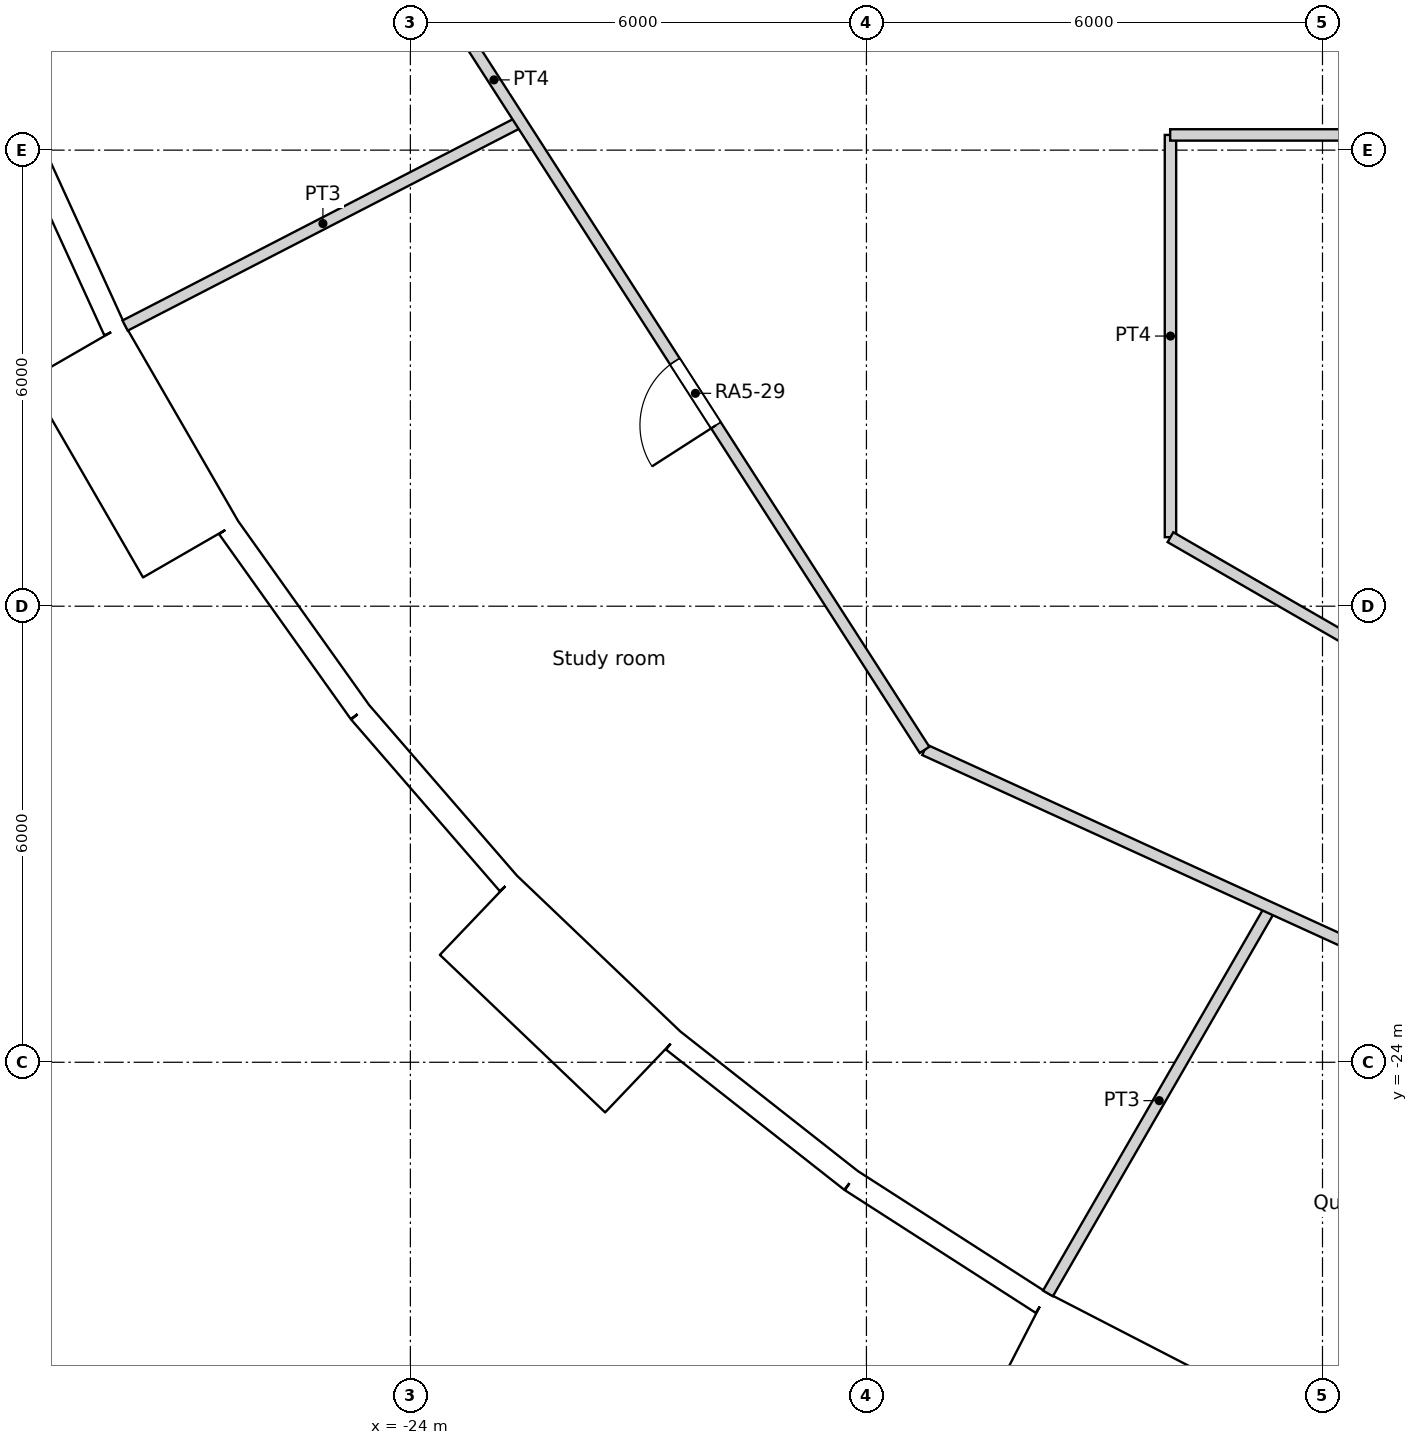
"""IFC4 building model, lengths in metres.
Left out: names, types, materials, properties, quantities, classifications, styles, units other than length and angle.
Written with IfcOpenShell. Run it as: python <this file> out.ifc"""

import sys

from ifc_helpers import new_model, si_unit, direction, frame, frame_2d, origin, origin_2d, place, context, subcontext, project, spatial, rectangle, circle, extrude, element, fill, save


model = new_model("IFC4")
c1 = context("Model", 3, precision=1e-05, world=origin(), true_north=direction((0.0, 1.0)))
c2 = subcontext(c1, "Body", "Model", "MODEL_VIEW")
j1 = project(units=[si_unit("LENGTHUNIT", "METRE"), si_unit("PLANEANGLEUNIT", "RADIAN")], contexts=[c1])
p1 = place(None, origin())
s1 = spatial("IfcSite", under=j1, at=p1, CompositionType="ELEMENT")
p2 = place(p1, origin())
s2 = spatial("IfcBuilding", under=s1, at=p2, CompositionType="ELEMENT")
p3 = place(p2, frame((0.0, 0.0, 71.4)))
s3 = spatial("IfcBuildingStorey", under=s2, at=p3, CompositionType="ELEMENT", Elevation=71.4)
for number, where, z_axis, x_axis in (
    (1, (-26.909, -13.873, 0.0), (0.0, 0.0, 1.0), (1.0, 0.0, 0.0)),
    (2, (-23.797, -18.715, 0.0), (0.0, 0.0, 1.0), (1.0, 0.0, 0.0)),
    (3, (-19.826, -22.88, 0.0), (0.0, 0.0, 1.0), (1.0, 0.0, 0.0)),
    (4, (-15.137, -26.219, 0.0), (0.0, 0.0, 1.0), (1.0, 0.0, 0.0)),
):
    element("IfcColumn", number, at=place(p3, frame(where, z_axis=z_axis, x_axis=x_axis)), inside=s3, PredefinedType="COLUMN", context=c2, shape_type="SweptSolid", body=[
        extrude(circle(Radius=0.6, at=origin_2d()), origin(), (0.0, 0.0, 1.0), 3.6),
    ])
for number, where, z_axis, x_axis in (
    (5, (-20.509, -13.489, 0.0), (0.0, 0.0, 1.0), (1.0, 0.0, 0.0)),
    (6, (-16.846, -17.855, 0.0), (0.0, 0.0, 1.0), (1.0, 0.0, 0.0)),
    (7, (-12.274, -21.259, 0.0), (0.0, 0.0, 1.0), (1.0, 0.0, 0.0)),
):
    element("IfcColumn", number, at=place(p3, frame(where, z_axis=z_axis, x_axis=x_axis)), inside=s3, PredefinedType="COLUMN", context=c2, shape_type="SweptSolid", body=[
        extrude(circle(Radius=0.65, at=origin_2d()), origin(), (0.0, 0.0, 1.0), 3.6),
    ])
p4 = place(p3, frame((-13.798, -12.802, 0.0), z_axis=(0.0, 0.0, 1.0), x_axis=(1.0, 0.0, 0.0)))
e8 = element("IfcColumn", 8, at=p4, inside=s3, PredefinedType="COLUMN", context=c2, shape_type="SweptSolid", body=[
    extrude(circle(Radius=0.7, at=origin_2d()), origin(), (0.0, 0.0, 1.0), 3.6),
])
p5 = place(p3, frame((-29.127, -11.661, 0.0), z_axis=(0.0, 0.0, 1.0), x_axis=(0.415407317162, -0.909635509888, 0.0)))
e9 = element("IfcWall", 9, at=p5, inside=s3, PredefinedType="SOLIDWALL", context=c2, shape_type="SweptSolid", body=[
    extrude(rectangle(XDim=2.98, YDim=0.3, at=frame_2d((1.49, 0.0))), origin(), (0.0, 0.0, 1.0), 3.15),
])
p6 = place(p5, frame((1.49, 0.0, 1.55)))
e10 = element("IfcOpeningElement", 10, at=p6, cuts=e9, PredefinedType="OPENING", context=c2, shape_type="SweptSolid", body=[
    extrude(circle(Radius=0.9, at=origin_2d()), frame((0.0, 0.16, 0.0), z_axis=(0.0, -1.0, 0.0), x_axis=(1.0, 0.0, 0.0)), (0.0, 0.0, 1.0), 0.32),
])
p7 = place(p3, frame((-28.388, -14.658, -0.45), z_axis=(0.0, 0.0, 1.0), x_axis=(0.499990139034, -0.866031096941, 0.0)))
e11 = element("IfcWall", 11, at=p7, inside=s3, PredefinedType="ELEMENTEDWALL", context=c2, shape_type="SweptSolid", body=[
    extrude(rectangle(XDim=3.0, YDim=1.45, at=frame_2d((1.5, 0.0))), origin(), (0.0, 0.0, 1.0), 3.6),
])
p8 = place(p7, frame((1.5, 0.0, 2.0)))
e12 = element("IfcOpeningElement", 12, at=p8, cuts=e11, PredefinedType="OPENING", context=c2, shape_type="SweptSolid", body=[
    extrude(circle(Radius=0.9, at=origin_2d()), frame((0.0, 0.735, 0.0), z_axis=(0.0, -1.0, 0.0), x_axis=(1.0, 0.0, 0.0)), (0.0, 0.0, 1.0), 1.47),
])
p9 = place(p3, frame((-26.39, -16.967, 0.0), z_axis=(0.0, 0.0, 1.0), x_axis=(0.580113774115, -0.814535456, 0.0)))
e13 = element("IfcWall", 13, at=p9, inside=s3, PredefinedType="SOLIDWALL", context=c2, shape_type="SweptSolid", body=[
    extrude(rectangle(XDim=2.98, YDim=0.3, at=frame_2d((1.49, 0.0))), origin(), (0.0, 0.0, 1.0), 3.15),
])
p10 = place(p9, frame((1.49, 0.0, 1.55)))
e14 = element("IfcOpeningElement", 14, at=p10, cuts=e13, PredefinedType="OPENING", context=c2, shape_type="SweptSolid", body=[
    extrude(circle(Radius=0.9, at=origin_2d()), frame((0.0, 0.16, 0.0), z_axis=(0.0, -1.0, 0.0), x_axis=(1.0, 0.0, 0.0)), (0.0, 0.0, 1.0), 0.32),
])
p11 = place(p3, frame((-24.662, -19.394, 0.0), z_axis=(0.0, 0.0, 1.0), x_axis=(0.654830712471, -0.755775587066, 0.0)))
e15 = element("IfcWall", 15, at=p11, inside=s3, PredefinedType="SOLIDWALL", context=c2, shape_type="SweptSolid", body=[
    extrude(rectangle(XDim=2.98, YDim=0.3, at=frame_2d((1.49, 0.0))), origin(), (0.0, 0.0, 1.0), 3.15),
])
p12 = place(p11, frame((1.49, 0.0, 1.55)))
e16 = element("IfcOpeningElement", 16, at=p12, cuts=e15, PredefinedType="OPENING", context=c2, shape_type="SweptSolid", body=[
    extrude(circle(Radius=0.9, at=origin_2d()), frame((0.0, 0.16, 0.0), z_axis=(0.0, -1.0, 0.0), x_axis=(1.0, 0.0, 0.0)), (0.0, 0.0, 1.0), 0.32),
])
p13 = place(p3, frame((-23.109, -22.062, -0.45), z_axis=(0.0, 0.0, 1.0), x_axis=(0.723712023899, -0.690102098579, 0.0)))
e17 = element("IfcWall", 17, at=p13, inside=s3, PredefinedType="ELEMENTEDWALL", context=c2, shape_type="SweptSolid", body=[
    extrude(rectangle(XDim=3.0, YDim=1.45, at=frame_2d((1.5, 0.0))), origin(), (0.0, 0.0, 1.0), 3.6),
])
p14 = place(p13, frame((1.5, 0.0, 2.0)))
e18 = element("IfcOpeningElement", 18, at=p14, cuts=e17, PredefinedType="OPENING", context=c2, shape_type="SweptSolid", body=[
    extrude(circle(Radius=0.9, at=origin_2d()), frame((0.0, 0.735, 0.0), z_axis=(0.0, -1.0, 0.0), x_axis=(1.0, 0.0, 0.0)), (0.0, 0.0, 1.0), 1.47),
])
p15 = place(p3, frame((-20.541, -23.715, 0.0), z_axis=(0.0, 0.0, 1.0), x_axis=(0.786053834673, -0.618158045322, 0.0)))
e19 = element("IfcWall", 19, at=p15, inside=s3, PredefinedType="SOLIDWALL", context=c2, shape_type="SweptSolid", body=[
    extrude(rectangle(XDim=2.979, YDim=0.3, at=frame_2d((1.49, 0.0))), origin(), (0.0, 0.0, 1.0), 3.15),
])
p16 = place(p15, frame((1.49, 0.0, 1.55)))
e20 = element("IfcOpeningElement", 20, at=p16, cuts=e19, PredefinedType="OPENING", context=c2, shape_type="SweptSolid", body=[
    extrude(circle(Radius=0.9, at=origin_2d()), frame((0.0, 0.16, 0.0), z_axis=(0.0, -1.0, 0.0), x_axis=(1.0, 0.0, 0.0)), (0.0, 0.0, 1.0), 0.32),
])
p17 = place(p3, frame((-18.199, -25.557, 0.0), z_axis=(0.0, 0.0, 1.0), x_axis=(0.841260995538, -0.54062920508, 0.0)))
e21 = element("IfcWall", 21, at=p17, inside=s3, PredefinedType="SOLIDWALL", context=c2, shape_type="SweptSolid", body=[
    extrude(rectangle(XDim=2.979, YDim=0.3, at=frame_2d((1.49, 0.0))), origin(), (0.0, 0.0, 1.0), 3.15),
])
p18 = place(p17, frame((1.49, 0.0, 1.55)))
e22 = element("IfcOpeningElement", 22, at=p18, cuts=e21, PredefinedType="OPENING", context=c2, shape_type="SweptSolid", body=[
    extrude(circle(Radius=0.9, at=origin_2d()), frame((0.0, 0.16, 0.0), z_axis=(0.0, -1.0, 0.0), x_axis=(1.0, 0.0, 0.0)), (0.0, 0.0, 1.0), 0.32),
])
p19 = place(p3, frame((-15.957, -27.679, -0.45), z_axis=(0.0, 0.0, 1.0), x_axis=(0.888858064689, -0.458182650083, 0.0)))
e23 = element("IfcWall", 23, at=p19, inside=s3, PredefinedType="ELEMENTEDWALL", context=c2, shape_type="SweptSolid", body=[
    extrude(rectangle(XDim=3.0, YDim=1.45, at=frame_2d((1.5, 0.0))), origin(), (0.0, 0.0, 1.0), 3.6),
])
p20 = place(p19, frame((1.5, 0.0, 2.0)))
e24 = element("IfcOpeningElement", 24, at=p20, cuts=e23, PredefinedType="OPENING", context=c2, shape_type="SweptSolid", body=[
    extrude(circle(Radius=0.9, at=origin_2d()), frame((0.0, 0.735, 0.0), z_axis=(0.0, -1.0, 0.0), x_axis=(1.0, 0.0, 0.0)), (0.0, 0.0, 1.0), 1.47),
])
p21 = place(p3, frame((-14.004, -11.8, 0.0), z_axis=(0.0, 0.0, 1.0), x_axis=(1.0, 0.0, 0.0)))
e25 = element("IfcWall", 25, at=p21, inside=s3, PredefinedType="PARTITIONING", context=c2, shape_type="SweptSolid", body=[
    extrude(rectangle(XDim=12.816, YDim=0.15, at=frame_2d((6.408, 0.0))), origin(), (0.0, 0.0, 1.0), 3.15),
])
p22 = place(p21, frame((5.908, 0.0, 0.0)))
e26 = element("IfcOpeningElement", 26, at=p22, cuts=e25, PredefinedType="OPENING", context=c2, shape_type="SweptSolid", body=[
    extrude(rectangle(XDim=1.0, YDim=2.04, at=frame_2d((0.5, 1.02))), frame((0.0, 0.075, 0.0), z_axis=(0.0, -1.0, 0.0), x_axis=(1.0, 0.0, 0.0)), (0.0, 0.0, 1.0), 0.15),
])
p23 = place(p3, frame((-14.0, -17.092, 0.0), z_axis=(0.0, 0.0, 1.0), x_axis=(0.0, 1.0, 0.0)))
e27 = element("IfcWall", 27, at=p23, inside=s3, PredefinedType="PARTITIONING", context=c2, shape_type="SweptSolid", body=[
    extrude(rectangle(XDim=5.292, YDim=0.15, at=frame_2d((2.646, 0.0))), origin(), (0.0, 0.0, 1.0), 3.15),
])
p24 = place(p3, frame((-25.253, -7.415, 0.0), z_axis=(0.0, 0.0, 1.0), x_axis=(0.540656073354, -0.841243728265, 0.0)))
e28 = element("IfcWall", 28, at=p24, inside=s3, PredefinedType="PARTITIONING", context=c2, shape_type="SweptSolid", body=[
    extrude(rectangle(XDim=14.829, YDim=0.15, at=frame_2d((7.415, 0.0))), origin(), (0.0, 0.0, 1.0), 3.15),
])
p25 = place(p24, frame((8.753, 0.0, 0.0)))
e29 = element("IfcOpeningElement", 29, at=p25, cuts=e28, PredefinedType="OPENING", context=c2, shape_type="SweptSolid", body=[
    extrude(rectangle(XDim=1.0, YDim=2.04, at=frame_2d((0.5, 1.02))), frame((0.0, 0.075, 0.0), z_axis=(0.0, -1.0, 0.0), x_axis=(1.0, 0.0, 0.0)), (0.0, 0.0, 1.0), 0.15),
])
p26 = place(p3, frame((-14.0, -17.092, 0.0), z_axis=(0.0, 0.0, 1.0), x_axis=(0.86602719091, -0.499996904595, 0.0)))
e30 = element("IfcWall", 30, at=p26, inside=s3, PredefinedType="PARTITIONING", context=c2, shape_type="SweptSolid", body=[
    extrude(rectangle(XDim=9.42, YDim=0.15, at=frame_2d((4.71, 0.0))), origin(), (0.0, 0.0, 1.0), 3.15),
])
p27 = place(p3, frame((-17.235, -19.89, 0.0), z_axis=(0.0, 0.0, 1.0), x_axis=(0.909645678785, -0.415385049163, 0.0)))
e31 = element("IfcWall", 31, at=p27, inside=s3, PredefinedType="PARTITIONING", context=c2, shape_type="SweptSolid", body=[
    extrude(rectangle(XDim=14.829, YDim=0.15, at=frame_2d((7.415, 0.0))), origin(), (0.0, 0.0, 1.0), 3.15),
])
p28 = place(p3, frame((-27.753, -14.308, 0.0), z_axis=(0.0, 0.0, 1.0), x_axis=(0.88877955153, 0.45833493079, 0.0)))
e32 = element("IfcWall", 32, at=p28, inside=s3, PredefinedType="PARTITIONING", context=c2, shape_type="SweptSolid", body=[
    extrude(rectangle(XDim=5.856, YDim=0.15, at=frame_2d((2.928, 0.0))), origin(), (0.0, 0.0, 1.0), 3.15),
])
p29 = place(p3, frame((-15.612, -27.041, 0.0), z_axis=(0.0, 0.0, 1.0), x_axis=(0.499954606878, 0.86605160993, 0.0)))
e33 = element("IfcWall", 33, at=p29, inside=s3, PredefinedType="PARTITIONING", context=c2, shape_type="SweptSolid", body=[
    extrude(rectangle(XDim=5.856, YDim=0.15, at=frame_2d((2.928, 0.0))), origin(), (0.0, 0.0, 1.0), 3.15),
])
p30 = place(p6, origin())
e34 = element("IfcWindow", 34, at=p30, inside=s3, PartitioningType="SINGLE_PANEL", PredefinedType="WINDOW", context=c2, shape_type="SweptSolid", body=[
    extrude(circle(Radius=0.9, at=origin_2d()), frame((0.0, 0.12, 0.0), z_axis=(0.0, -1.0, 0.0), x_axis=(1.0, 0.0, 0.0)), (0.0, 0.0, 1.0), 0.1),
])
fill(e10, e34)
p31 = place(p8, origin())
e35 = element("IfcWindow", 35, at=p31, inside=s3, PartitioningType="SINGLE_PANEL", PredefinedType="WINDOW", context=c2, shape_type="SweptSolid", body=[
    extrude(circle(Radius=0.9, at=origin_2d()), frame((0.0, 0.695, 0.0), z_axis=(0.0, -1.0, 0.0), x_axis=(1.0, 0.0, 0.0)), (0.0, 0.0, 1.0), 0.1),
])
fill(e12, e35)
p32 = place(p10, origin())
e36 = element("IfcWindow", 36, at=p32, inside=s3, PartitioningType="SINGLE_PANEL", PredefinedType="WINDOW", context=c2, shape_type="SweptSolid", body=[
    extrude(circle(Radius=0.9, at=origin_2d()), frame((0.0, 0.12, 0.0), z_axis=(0.0, -1.0, 0.0), x_axis=(1.0, 0.0, 0.0)), (0.0, 0.0, 1.0), 0.1),
])
fill(e14, e36)
p33 = place(p12, origin())
e37 = element("IfcWindow", 37, at=p33, inside=s3, PartitioningType="SINGLE_PANEL", PredefinedType="WINDOW", context=c2, shape_type="SweptSolid", body=[
    extrude(circle(Radius=0.9, at=origin_2d()), frame((0.0, 0.12, 0.0), z_axis=(0.0, -1.0, 0.0), x_axis=(1.0, 0.0, 0.0)), (0.0, 0.0, 1.0), 0.1),
])
fill(e16, e37)
p34 = place(p14, origin())
e38 = element("IfcWindow", 38, at=p34, inside=s3, PartitioningType="SINGLE_PANEL", PredefinedType="WINDOW", context=c2, shape_type="SweptSolid", body=[
    extrude(circle(Radius=0.9, at=origin_2d()), frame((0.0, 0.695, 0.0), z_axis=(0.0, -1.0, 0.0), x_axis=(1.0, 0.0, 0.0)), (0.0, 0.0, 1.0), 0.1),
])
fill(e18, e38)
p35 = place(p16, origin())
e39 = element("IfcWindow", 39, at=p35, inside=s3, PartitioningType="SINGLE_PANEL", PredefinedType="WINDOW", context=c2, shape_type="SweptSolid", body=[
    extrude(circle(Radius=0.9, at=origin_2d()), frame((0.0, 0.12, 0.0), z_axis=(0.0, -1.0, 0.0), x_axis=(1.0, 0.0, 0.0)), (0.0, 0.0, 1.0), 0.1),
])
fill(e20, e39)
p36 = place(p18, origin())
e40 = element("IfcWindow", 40, at=p36, inside=s3, PartitioningType="SINGLE_PANEL", PredefinedType="WINDOW", context=c2, shape_type="SweptSolid", body=[
    extrude(circle(Radius=0.9, at=origin_2d()), frame((0.0, 0.12, 0.0), z_axis=(0.0, -1.0, 0.0), x_axis=(1.0, 0.0, 0.0)), (0.0, 0.0, 1.0), 0.1),
])
fill(e22, e40)
p37 = place(p20, origin())
e41 = element("IfcWindow", 41, at=p37, inside=s3, PartitioningType="SINGLE_PANEL", PredefinedType="WINDOW", context=c2, shape_type="SweptSolid", body=[
    extrude(circle(Radius=0.9, at=origin_2d()), frame((0.0, 0.695, 0.0), z_axis=(0.0, -1.0, 0.0), x_axis=(1.0, 0.0, 0.0)), (0.0, 0.0, 1.0), 0.1),
])
fill(e24, e41)
p38 = place(p25, origin())
e42 = element("IfcDoor", 42, at=p38, inside=s3, OperationType="SINGLE_SWING_LEFT", PredefinedType="DOOR", context=c2, shape_type="SweptSolid", body=[
    extrude(rectangle(XDim=1.0, YDim=2.04, at=frame_2d((0.5, 1.02))), frame((0.0, 0.025, 0.0), z_axis=(0.0, -1.0, 0.0), x_axis=(1.0, 0.0, 0.0)), (0.0, 0.0, 1.0), 0.05),
])
fill(e29, e42)
save(model, sys.argv[1])
